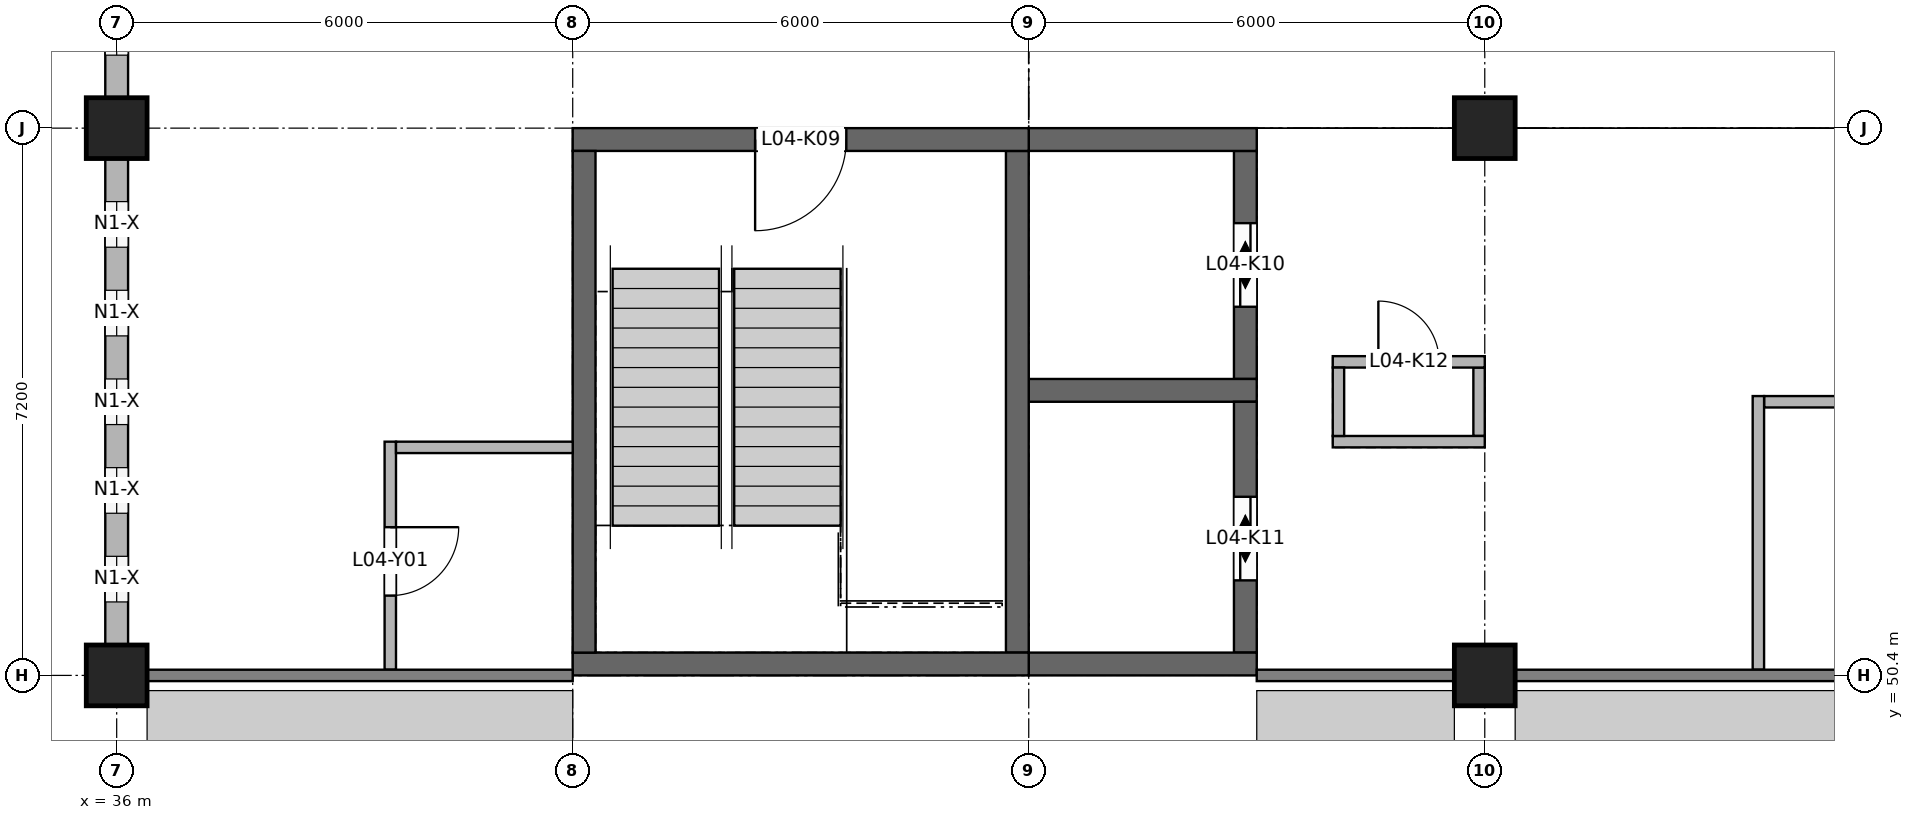
"""IFC4 building model, lengths in metres.
Left out: names, types, materials, properties, quantities, classifications, styles, units other than length and angle.
Written with IfcOpenShell. Run it as: python <this file> out.ifc"""

import sys

from ifc_helpers import new_model, si_unit, direction, frame, frame_2d, origin, origin_2d, place, context, subcontext, project, spatial, rectangle, extrude, element, fill, save


model = new_model("IFC4")
c1 = context("Model", 3, precision=1e-05, world=origin(), true_north=direction((0.0, 1.0)))
c2 = subcontext(c1, "Body", "Model", "MODEL_VIEW")
j1 = project(units=[si_unit("LENGTHUNIT", "METRE"), si_unit("PLANEANGLEUNIT", "RADIAN")], contexts=[c1])
p1 = place(None, origin())
s1 = spatial("IfcSite", under=j1, at=p1, CompositionType="ELEMENT")
p2 = place(p1, origin())
s2 = spatial("IfcBuilding", under=s1, at=p2, CompositionType="ELEMENT")
p3 = place(p2, frame((0.0, 0.0, 16.8)))
s3 = spatial("IfcBuildingStorey", under=s2, at=p3, CompositionType="ELEMENT", Elevation=16.8)
p4 = place(p3, frame((42.0, 50.55, 0.0), z_axis=(0.0, 0.0, 1.0), x_axis=(1.0, 0.0, 0.0)))
e1 = element("IfcWall", 1, at=p4, inside=s3, PredefinedType="SHEAR", context=c2, shape_type="SweptSolid", body=[
    extrude(rectangle(XDim=6.0, YDim=0.3, at=frame_2d((3.0, 0.0))), origin(), (0.0, 0.0, 1.0), 4.0),
])
p5 = place(p3, frame((42.0, 57.45, 0.0), z_axis=(0.0, 0.0, 1.0), x_axis=(1.0, 0.0, 0.0)))
e2 = element("IfcWall", 2, at=p5, inside=s3, PredefinedType="SHEAR", context=c2, shape_type="SweptSolid", body=[
    extrude(rectangle(XDim=6.0, YDim=0.3, at=frame_2d((3.0, 0.0))), origin(), (0.0, 0.0, 1.0), 4.0),
])
p6 = place(p5, frame((2.4, 0.0, 0.0)))
e3 = element("IfcOpeningElement", 3, at=p6, cuts=e2, PredefinedType="OPENING", context=c2, shape_type="SweptSolid", body=[
    extrude(rectangle(XDim=1.2, YDim=2.1, at=frame_2d((0.6, 1.05))), frame((0.0, 0.16, 0.0), z_axis=(0.0, -1.0, 0.0), x_axis=(1.0, 0.0, 0.0)), (0.0, 0.0, 1.0), 0.32),
])
for number, where, z_axis, x_axis in (
    (4, (42.15, 50.7, 0.0), (0.0, 0.0, 1.0), (0.0, 1.0, 0.0)),
    (5, (47.85, 50.7, 0.0), (0.0, 0.0, 1.0), (0.0, 1.0, 0.0)),
):
    element("IfcWall", number, at=place(p3, frame(where, z_axis=z_axis, x_axis=x_axis)), inside=s3, PredefinedType="SHEAR", context=c2, shape_type="SweptSolid", body=[
        extrude(rectangle(XDim=6.6, YDim=0.3, at=frame_2d((3.3, 0.0))), origin(), (0.0, 0.0, 1.0), 4.0),
    ])
for number, where, z_axis, x_axis in (
    (6, (48.0, 54.15, 0.0), (0.0, 0.0, 1.0), (1.0, 0.0, 0.0)),
    (7, (48.0, 57.45, 0.0), (0.0, 0.0, 1.0), (1.0, 0.0, 0.0)),
):
    element("IfcWall", number, at=place(p3, frame(where, z_axis=z_axis, x_axis=x_axis)), inside=s3, PredefinedType="SHEAR", context=c2, shape_type="SweptSolid", body=[
        extrude(rectangle(XDim=3.0, YDim=0.3, at=frame_2d((1.5, 0.0))), origin(), (0.0, 0.0, 1.0), 4.2),
    ])
p7 = place(p3, frame((50.85, 54.3, 0.0), z_axis=(0.0, 0.0, 1.0), x_axis=(0.0, 1.0, 0.0)))
e8 = element("IfcWall", 8, at=p7, inside=s3, PredefinedType="SHEAR", context=c2, shape_type="SweptSolid", body=[
    extrude(rectangle(XDim=3.0, YDim=0.3, at=frame_2d((1.5, 0.0))), origin(), (0.0, 0.0, 1.0), 4.2),
])
p8 = place(p7, frame((0.95, 0.0, 0.0)))
e9 = element("IfcOpeningElement", 9, at=p8, cuts=e8, PredefinedType="OPENING", context=c2, shape_type="SweptSolid", body=[
    extrude(rectangle(XDim=1.1, YDim=2.1, at=frame_2d((0.55, 1.05))), frame((0.0, 0.16, 0.0), z_axis=(0.0, -1.0, 0.0), x_axis=(1.0, 0.0, 0.0)), (0.0, 0.0, 1.0), 0.32),
])
p9 = place(p3, frame((48.0, 50.55, 0.0), z_axis=(0.0, 0.0, 1.0), x_axis=(1.0, 0.0, 0.0)))
e10 = element("IfcWall", 10, at=p9, inside=s3, PredefinedType="SHEAR", context=c2, shape_type="SweptSolid", body=[
    extrude(rectangle(XDim=3.0, YDim=0.3, at=frame_2d((1.5, 0.0))), origin(), (0.0, 0.0, 1.0), 4.2),
])
p10 = place(p3, frame((50.85, 50.7, 0.0), z_axis=(0.0, 0.0, 1.0), x_axis=(0.0, 1.0, 0.0)))
e11 = element("IfcWall", 11, at=p10, inside=s3, PredefinedType="SHEAR", context=c2, shape_type="SweptSolid", body=[
    extrude(rectangle(XDim=3.3, YDim=0.3, at=frame_2d((1.65, 0.0))), origin(), (0.0, 0.0, 1.0), 4.2),
])
p11 = place(p10, frame((0.95, 0.0, 0.0)))
e12 = element("IfcOpeningElement", 12, at=p11, cuts=e11, PredefinedType="OPENING", context=c2, shape_type="SweptSolid", body=[
    extrude(rectangle(XDim=1.1, YDim=2.1, at=frame_2d((0.55, 1.05))), frame((0.0, 0.16, 0.0), z_axis=(0.0, -1.0, 0.0), x_axis=(1.0, 0.0, 0.0)), (0.0, 0.0, 1.0), 0.32),
])
p12 = place(p3, frame((52.0, 53.475, 0.0), z_axis=(0.0, 0.0, 1.0), x_axis=(1.0, 0.0, 0.0)))
e13 = element("IfcWall", 13, at=p12, inside=s3, PredefinedType="SOLIDWALL", context=c2, shape_type="SweptSolid", body=[
    extrude(rectangle(XDim=2.0, YDim=0.15, at=frame_2d((1.0, 0.0))), origin(), (0.0, 0.0, 1.0), 4.2),
])
p13 = place(p3, frame((52.0, 54.525, 0.0), z_axis=(0.0, 0.0, 1.0), x_axis=(1.0, 0.0, 0.0)))
e14 = element("IfcWall", 14, at=p13, inside=s3, PredefinedType="SOLIDWALL", context=c2, shape_type="SweptSolid", body=[
    extrude(rectangle(XDim=2.0, YDim=0.15, at=frame_2d((1.0, 0.0))), origin(), (0.0, 0.0, 1.0), 4.2),
])
p14 = place(p13, frame((0.6, 0.0, 0.0)))
e15 = element("IfcOpeningElement", 15, at=p14, cuts=e14, PredefinedType="OPENING", context=c2, shape_type="SweptSolid", body=[
    extrude(rectangle(XDim=0.8, YDim=2.1, at=frame_2d((0.4, 1.05))), frame((0.0, 0.085, 0.0), z_axis=(0.0, -1.0, 0.0), x_axis=(1.0, 0.0, 0.0)), (0.0, 0.0, 1.0), 0.17),
])
p15 = place(p3, frame((52.075, 53.55, 0.0), z_axis=(0.0, 0.0, 1.0), x_axis=(0.0, 1.0, 0.0)))
e16 = element("IfcWall", 16, at=p15, inside=s3, PredefinedType="SOLIDWALL", context=c2, shape_type="SweptSolid", body=[
    extrude(rectangle(XDim=0.9, YDim=0.15, at=frame_2d((0.45, 0.0))), origin(), (0.0, 0.0, 1.0), 4.2),
])
p16 = place(p3, frame((53.925, 53.55, 0.0), z_axis=(0.0, 0.0, 1.0), x_axis=(0.0, 1.0, 0.0)))
e17 = element("IfcWall", 17, at=p16, inside=s3, PredefinedType="SOLIDWALL", context=c2, shape_type="SweptSolid", body=[
    extrude(rectangle(XDim=0.9, YDim=0.15, at=frame_2d((0.45, 0.0))), origin(), (0.0, 0.0, 1.0), 3.1),
])
for number, where, z_axis, x_axis in (
    (18, (36.0, 50.4, 0.0), (0.0, 0.0, 1.0), (1.0, 0.0, 0.0)),
    (19, (54.0, 50.4, 0.0), (0.0, 0.0, 1.0), (1.0, 0.0, 0.0)),
    (20, (36.0, 57.6, 0.0), (0.0, 0.0, 1.0), (1.0, 0.0, 0.0)),
    (21, (54.0, 57.6, 0.0), (0.0, 0.0, 1.0), (1.0, 0.0, 0.0)),
):
    element("IfcColumn", number, at=place(p3, frame(where, z_axis=z_axis, x_axis=x_axis)), inside=s3, PredefinedType="COLUMN", context=c2, shape_type="SweptSolid", body=[
        extrude(rectangle(XDim=0.8, YDim=0.8, at=origin_2d()), origin(), (0.0, 0.0, 1.0), 4.0),
    ])
p17 = place(p3, frame((36.0, 50.8, 0.0), z_axis=(0.0, 0.0, 1.0), x_axis=(0.0, 1.0, 0.0)))
e22 = element("IfcWall", 22, at=p17, inside=s3, PredefinedType="SOLIDWALL", context=c2, shape_type="SweptSolid", body=[
    extrude(rectangle(XDim=6.4, YDim=0.3, at=frame_2d((3.2, 0.0))), origin(), (0.0, 0.0, 1.0), 3.1),
])
p18 = place(p17, frame((0.567, 0.0, 0.9)))
e23 = element("IfcOpeningElement", 23, at=p18, cuts=e22, PredefinedType="OPENING", context=c2, shape_type="SweptSolid", body=[
    extrude(rectangle(XDim=0.6, YDim=1.9, at=frame_2d((0.3, 0.95))), frame((0.0, 0.16, 0.0), z_axis=(0.0, -1.0, 0.0), x_axis=(1.0, 0.0, 0.0)), (0.0, 0.0, 1.0), 0.32),
])
p19 = place(p17, frame((1.733, 0.0, 0.9)))
e24 = element("IfcOpeningElement", 24, at=p19, cuts=e22, PredefinedType="OPENING", context=c2, shape_type="SweptSolid", body=[
    extrude(rectangle(XDim=0.6, YDim=1.9, at=frame_2d((0.3, 0.95))), frame((0.0, 0.16, 0.0), z_axis=(0.0, -1.0, 0.0), x_axis=(1.0, 0.0, 0.0)), (0.0, 0.0, 1.0), 0.32),
])
p20 = place(p17, frame((2.9, 0.0, 0.9)))
e25 = element("IfcOpeningElement", 25, at=p20, cuts=e22, PredefinedType="OPENING", context=c2, shape_type="SweptSolid", body=[
    extrude(rectangle(XDim=0.6, YDim=1.9, at=frame_2d((0.3, 0.95))), frame((0.0, 0.16, 0.0), z_axis=(0.0, -1.0, 0.0), x_axis=(1.0, 0.0, 0.0)), (0.0, 0.0, 1.0), 0.32),
])
p21 = place(p17, frame((4.067, 0.0, 0.9)))
e26 = element("IfcOpeningElement", 26, at=p21, cuts=e22, PredefinedType="OPENING", context=c2, shape_type="SweptSolid", body=[
    extrude(rectangle(XDim=0.6, YDim=1.9, at=frame_2d((0.3, 0.95))), frame((0.0, 0.16, 0.0), z_axis=(0.0, -1.0, 0.0), x_axis=(1.0, 0.0, 0.0)), (0.0, 0.0, 1.0), 0.32),
])
p22 = place(p17, frame((5.233, 0.0, 0.9)))
e27 = element("IfcOpeningElement", 27, at=p22, cuts=e22, PredefinedType="OPENING", context=c2, shape_type="SweptSolid", body=[
    extrude(rectangle(XDim=0.6, YDim=1.9, at=frame_2d((0.3, 0.95))), frame((0.0, 0.16, 0.0), z_axis=(0.0, -1.0, 0.0), x_axis=(1.0, 0.0, 0.0)), (0.0, 0.0, 1.0), 0.32),
])
p23 = place(p3, frame((36.0, 58.0, 0.0), z_axis=(0.0, 0.0, 1.0), x_axis=(0.0, 1.0, 0.0)))
e28 = element("IfcWall", 28, at=p23, inside=s3, PredefinedType="SOLIDWALL", context=c2, shape_type="SweptSolid", body=[
    extrude(rectangle(XDim=6.4, YDim=0.3, at=frame_2d((3.2, 0.0))), origin(), (0.0, 0.0, 1.0), 3.1),
])
p24 = place(p23, frame((0.56, 0.0, 0.9)))
e29 = element("IfcOpeningElement", 29, at=p24, cuts=e28, PredefinedType="OPENING", context=c2, shape_type="SweptSolid", body=[
    extrude(rectangle(XDim=0.6, YDim=1.9, at=frame_2d((0.3, 0.95))), frame((0.0, 0.16, 0.0), z_axis=(0.0, -1.0, 0.0), x_axis=(1.0, 0.0, 0.0)), (0.0, 0.0, 1.0), 0.32),
])
p25 = place(p23, frame((2.86, 0.0, 0.9)))
e30 = element("IfcOpeningElement", 30, at=p25, cuts=e28, PredefinedType="OPENING", context=c2, shape_type="SweptSolid", body=[
    extrude(rectangle(XDim=0.6, YDim=1.9, at=frame_2d((0.3, 0.95))), frame((0.0, 0.16, 0.0), z_axis=(0.0, -1.0, 0.0), x_axis=(1.0, 0.0, 0.0)), (0.0, 0.0, 1.0), 0.32),
])
p26 = place(p23, frame((4.04, 0.0, 0.9)))
e31 = element("IfcOpeningElement", 31, at=p26, cuts=e28, PredefinedType="OPENING", context=c2, shape_type="SweptSolid", body=[
    extrude(rectangle(XDim=0.6, YDim=1.9, at=frame_2d((0.3, 0.95))), frame((0.0, 0.16, 0.0), z_axis=(0.0, -1.0, 0.0), x_axis=(1.0, 0.0, 0.0)), (0.0, 0.0, 1.0), 0.32),
])
p27 = place(p23, frame((5.22, 0.0, 0.9)))
e32 = element("IfcOpeningElement", 32, at=p27, cuts=e28, PredefinedType="OPENING", context=c2, shape_type="SweptSolid", body=[
    extrude(rectangle(XDim=0.6, YDim=1.9, at=frame_2d((0.3, 0.95))), frame((0.0, 0.16, 0.0), z_axis=(0.0, -1.0, 0.0), x_axis=(1.0, 0.0, 0.0)), (0.0, 0.0, 1.0), 0.32),
])
p28 = place(p2, frame((0.0, 0.0, 12.6)))
s4 = spatial("IfcBuildingStorey", under=s2, at=p28, CompositionType="ELEMENT", Elevation=12.6)
p29 = place(p28, frame((48.0, 57.6, 0.0), z_axis=(0.0, 0.0, 1.0), x_axis=(0.0, 1.0, 0.0)))
e33 = element("IfcWall", 33, at=p29, inside=s4, PredefinedType="PARTITIONING", context=c2, shape_type="SweptSolid", body=[
    extrude(rectangle(XDim=6.7, YDim=0.2, at=frame_2d((3.35, 0.0))), origin(), (0.0, 0.0, 1.0), 8.2),
])
p30 = place(p3, frame((39.6, 50.475, 0.0), z_axis=(0.0, 0.0, 1.0), x_axis=(0.0, 1.0, 0.0)))
e34 = element("IfcWall", 34, at=p30, inside=s3, PredefinedType="PARTITIONING", context=c2, shape_type="SweptSolid", body=[
    extrude(rectangle(XDim=3.0, YDim=0.15, at=frame_2d((1.5, 0.0))), origin(), (0.0, 0.0, 1.0), 4.0),
])
p31 = place(p30, frame((0.975, 0.0, 0.0)))
e35 = element("IfcOpeningElement", 35, at=p31, cuts=e34, PredefinedType="OPENING", context=c2, shape_type="SweptSolid", body=[
    extrude(rectangle(XDim=0.9, YDim=2.1, at=frame_2d((0.45, 1.05))), frame((0.0, 0.085, 0.0), z_axis=(0.0, -1.0, 0.0), x_axis=(1.0, 0.0, 0.0)), (0.0, 0.0, 1.0), 0.17),
])
p32 = place(p3, frame((57.6, 50.475, 0.0), z_axis=(0.0, 0.0, 1.0), x_axis=(0.0, 1.0, 0.0)))
e36 = element("IfcWall", 36, at=p32, inside=s3, PredefinedType="PARTITIONING", context=c2, shape_type="SweptSolid", body=[
    extrude(rectangle(XDim=3.6, YDim=0.15, at=frame_2d((1.8, 0.0))), origin(), (0.0, 0.0, 1.0), 3.2),
])
p33 = place(p3, frame((39.675, 53.4, 0.0), z_axis=(0.0, 0.0, 1.0), x_axis=(1.0, 0.0, 0.0)))
e37 = element("IfcWall", 37, at=p33, inside=s3, PredefinedType="PARTITIONING", context=c2, shape_type="SweptSolid", body=[
    extrude(rectangle(XDim=2.325, YDim=0.15, at=frame_2d((1.163, 0.0))), origin(), (0.0, 0.0, 1.0), 4.0),
])
p34 = place(p3, frame((57.675, 54.0, 0.0), z_axis=(0.0, 0.0, 1.0), x_axis=(1.0, 0.0, 0.0)))
e38 = element("IfcWall", 38, at=p34, inside=s3, PredefinedType="PARTITIONING", context=c2, shape_type="SweptSolid", body=[
    extrude(rectangle(XDim=8.25, YDim=0.15, at=frame_2d((4.125, 0.0))), origin(), (0.0, 0.0, 1.0), 3.1),
])
p35 = place(p34, frame((3.525, 0.0, 0.0)))
e39 = element("IfcOpeningElement", 39, at=p35, cuts=e38, PredefinedType="OPENING", context=c2, shape_type="SweptSolid", body=[
    extrude(rectangle(XDim=1.2, YDim=2.1, at=frame_2d((0.6, 1.05))), frame((0.0, 0.085, 0.0), z_axis=(0.0, -1.0, 0.0), x_axis=(1.0, 0.0, 0.0)), (0.0, 0.0, 1.0), 0.17),
])
p36 = place(p18, origin())
e40 = element("IfcWindow", 40, at=p36, inside=s3, PartitioningType="SINGLE_PANEL", PredefinedType="WINDOW", context=c2, shape_type="SweptSolid", body=[
    extrude(rectangle(XDim=0.6, YDim=1.9, at=frame_2d((0.3, 0.95))), frame((0.0, 0.03, 0.0), z_axis=(0.0, -1.0, 0.0), x_axis=(1.0, 0.0, 0.0)), (0.0, 0.0, 1.0), 0.06),
])
fill(e23, e40)
p37 = place(p19, origin())
e41 = element("IfcWindow", 41, at=p37, inside=s3, PartitioningType="SINGLE_PANEL", PredefinedType="WINDOW", context=c2, shape_type="SweptSolid", body=[
    extrude(rectangle(XDim=0.6, YDim=1.9, at=frame_2d((0.3, 0.95))), frame((0.0, 0.03, 0.0), z_axis=(0.0, -1.0, 0.0), x_axis=(1.0, 0.0, 0.0)), (0.0, 0.0, 1.0), 0.06),
])
fill(e24, e41)
p38 = place(p20, origin())
e42 = element("IfcWindow", 42, at=p38, inside=s3, PartitioningType="SINGLE_PANEL", PredefinedType="WINDOW", context=c2, shape_type="SweptSolid", body=[
    extrude(rectangle(XDim=0.6, YDim=1.9, at=frame_2d((0.3, 0.95))), frame((0.0, 0.03, 0.0), z_axis=(0.0, -1.0, 0.0), x_axis=(1.0, 0.0, 0.0)), (0.0, 0.0, 1.0), 0.06),
])
fill(e25, e42)
p39 = place(p21, origin())
e43 = element("IfcWindow", 43, at=p39, inside=s3, PartitioningType="SINGLE_PANEL", PredefinedType="WINDOW", context=c2, shape_type="SweptSolid", body=[
    extrude(rectangle(XDim=0.6, YDim=1.9, at=frame_2d((0.3, 0.95))), frame((0.0, 0.03, 0.0), z_axis=(0.0, -1.0, 0.0), x_axis=(1.0, 0.0, 0.0)), (0.0, 0.0, 1.0), 0.06),
])
fill(e26, e43)
p40 = place(p22, origin())
e44 = element("IfcWindow", 44, at=p40, inside=s3, PartitioningType="SINGLE_PANEL", PredefinedType="WINDOW", context=c2, shape_type="SweptSolid", body=[
    extrude(rectangle(XDim=0.6, YDim=1.9, at=frame_2d((0.3, 0.95))), frame((0.0, 0.03, 0.0), z_axis=(0.0, -1.0, 0.0), x_axis=(1.0, 0.0, 0.0)), (0.0, 0.0, 1.0), 0.06),
])
fill(e27, e44)
p41 = place(p24, origin())
e45 = element("IfcWindow", 45, at=p41, inside=s3, PartitioningType="SINGLE_PANEL", PredefinedType="WINDOW", context=c2, shape_type="SweptSolid", body=[
    extrude(rectangle(XDim=0.6, YDim=1.9, at=frame_2d((0.3, 0.95))), frame((0.0, 0.03, 0.0), z_axis=(0.0, -1.0, 0.0), x_axis=(1.0, 0.0, 0.0)), (0.0, 0.0, 1.0), 0.06),
])
fill(e29, e45)
p42 = place(p6, frame((1.2, 0.0, 0.0), z_axis=(0.0, 0.0, 1.0), x_axis=(-1.0, 0.0, 0.0)))
e46 = element("IfcDoor", 46, at=p42, inside=s3, OperationType="SINGLE_SWING_RIGHT", PredefinedType="DOOR", context=c2, shape_type="SweptSolid", body=[
    extrude(rectangle(XDim=1.2, YDim=2.1, at=frame_2d((0.6, 1.05))), frame((0.0, 0.025, 0.0), z_axis=(0.0, -1.0, 0.0), x_axis=(1.0, 0.0, 0.0)), (0.0, 0.0, 1.0), 0.05),
])
fill(e3, e46)
p43 = place(p8, origin())
e47 = element("IfcDoor", 47, at=p43, inside=s3, OperationType="DOUBLE_DOOR_SLIDING", PredefinedType="DOOR", context=c2, shape_type="SweptSolid", body=[
    extrude(rectangle(XDim=1.1, YDim=2.1, at=frame_2d((0.55, 1.05))), frame((0.0, 0.025, 0.0), z_axis=(0.0, -1.0, 0.0), x_axis=(1.0, 0.0, 0.0)), (0.0, 0.0, 1.0), 0.05),
])
fill(e9, e47)
p44 = place(p11, origin())
e48 = element("IfcDoor", 48, at=p44, inside=s3, OperationType="DOUBLE_DOOR_SLIDING", PredefinedType="DOOR", context=c2, shape_type="SweptSolid", body=[
    extrude(rectangle(XDim=1.1, YDim=2.1, at=frame_2d((0.55, 1.05))), frame((0.0, 0.025, 0.0), z_axis=(0.0, -1.0, 0.0), x_axis=(1.0, 0.0, 0.0)), (0.0, 0.0, 1.0), 0.05),
])
fill(e12, e48)
p45 = place(p14, origin())
e49 = element("IfcDoor", 49, at=p45, inside=s3, OperationType="SINGLE_SWING_LEFT", PredefinedType="DOOR", context=c2, shape_type="SweptSolid", body=[
    extrude(rectangle(XDim=0.8, YDim=2.1, at=frame_2d((0.4, 1.05))), frame((0.0, 0.025, 0.0), z_axis=(0.0, -1.0, 0.0), x_axis=(1.0, 0.0, 0.0)), (0.0, 0.0, 1.0), 0.05),
])
fill(e15, e49)
p46 = place(p31, frame((0.9, 0.0, 0.0), z_axis=(0.0, 0.0, 1.0), x_axis=(-1.0, 0.0, 0.0)))
e50 = element("IfcDoor", 50, at=p46, inside=s3, OperationType="SINGLE_SWING_LEFT", PredefinedType="DOOR", context=c2, shape_type="SweptSolid", body=[
    extrude(rectangle(XDim=0.9, YDim=2.1, at=frame_2d((0.45, 1.05))), frame((0.0, 0.025, 0.0), z_axis=(0.0, -1.0, 0.0), x_axis=(1.0, 0.0, 0.0)), (0.0, 0.0, 1.0), 0.05),
])
fill(e35, e50)
save(model, sys.argv[1])
